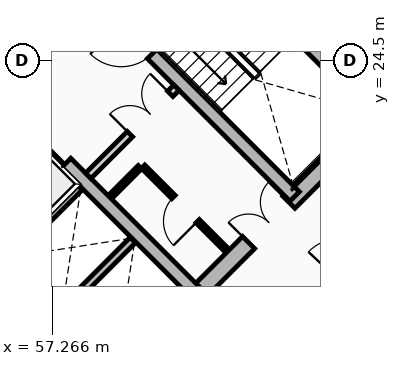
"""IFC4 building model, lengths in metres.
Left out: names, types, materials, properties, quantities, classifications, styles, units other than length and angle.
Written with IfcOpenShell. Run it as: python <this file> out.ifc"""

import sys

from ifc_helpers import new_model, si_unit, direction, frame, frame_2d, origin, place, context, subcontext, project, spatial, rectangle, extrude, source, transform, mapped, element, fill, save


model = new_model("IFC4")
c1 = context("Model", 3, precision=1e-05, world=origin(), true_north=direction((0.0, 1.0)))
c2 = subcontext(c1, "Body", "Model", "MODEL_VIEW")
j1 = project(units=[si_unit("LENGTHUNIT", "METRE"), si_unit("PLANEANGLEUNIT", "RADIAN")], contexts=[c1])
p1 = place(None, origin())
s1 = spatial("IfcSite", under=j1, at=p1, CompositionType="ELEMENT")
p2 = place(p1, origin())
s2 = spatial("IfcBuilding", under=s1, at=p2, CompositionType="ELEMENT")
p3 = place(p2, frame((0.0, 0.0, 122.53)))
s3 = spatial("IfcBuildingStorey", under=s2, at=p3, CompositionType="ELEMENT", Elevation=122.53)
for number, where, z_axis, x_axis in (
    (1, (58.737, 15.697, 0.0), (0.0, 0.0, 1.0), (-0.707, 0.707, 0.0)),
    (2, (66.303, 23.263, 0.0), (0.0, 0.0, 1.0), (-0.707, 0.707, 0.0)),
):
    element("IfcWall", number, at=place(p3, frame(where, z_axis=z_axis, x_axis=x_axis)), inside=s3, PredefinedType="SHEAR", context=c2, shape_type="SweptSolid", body=[
        extrude(rectangle(XDim=14.2, YDim=0.45, at=frame_2d((7.1, 0.0))), origin(), (0.0, 0.0, 1.0), 2.91),
    ])
p4 = place(p3, frame((58.578, 15.856, 0.0), z_axis=(0.0, 0.0, 1.0), x_axis=(0.707106781187, 0.707106781187, 0.0)))
e3 = element("IfcWall", 3, at=p4, inside=s3, PredefinedType="SHEAR", context=c2, shape_type="SweptSolid", body=[
    extrude(rectangle(XDim=10.7, YDim=0.45, at=frame_2d((5.35, 0.0))), origin(), (0.0, 0.0, 1.0), 2.91),
])
m1 = source(origin(), c2, "Body", "SweptSolid", [
    extrude(rectangle(XDim=1.5, YDim=2.02, at=frame_2d((0.75, 1.01))), frame((0.0, 0.235, 0.0), z_axis=(0.0, -1.0, 0.0), x_axis=(1.0, 0.0, 0.0)), (0.0, 0.0, 1.0), 0.47),
])
p5 = place(p4, frame((5.45, 0.0, 0.0)))
e4 = element("IfcOpeningElement", 4, at=p5, cuts=e3, PredefinedType="OPENING", context=c2, shape_type="MappedRepresentation", body=[
    mapped(m1, transform((0.0, 0.0, 0.0), x_axis=(1.0, 0.0, 0.0), y_axis=(0.0, 1.0, 0.0), z_axis=(0.0, 0.0, 1.0), scale=1.0)),
])
p6 = place(p3, frame((61.078, 18.355, 0.0), z_axis=(0.0, 0.0, 1.0), x_axis=(-0.707106781187, 0.707106781187, 0.0)))
e5 = element("IfcWall", 5, at=p6, inside=s3, PredefinedType="SHEAR", context=c2, shape_type="SweptSolid", body=[
    extrude(rectangle(XDim=13.75, YDim=0.35, at=frame_2d((6.875, 0.0))), origin(), (0.0, 0.0, 1.0), 2.91),
])
m2 = source(origin(), c2, "Body", "SweptSolid", [
    extrude(rectangle(XDim=1.1, YDim=2.015, at=frame_2d((0.55, 1.007))), frame((0.0, 0.185, 0.0), z_axis=(0.0, -1.0, 0.0), x_axis=(1.0, 0.0, 0.0)), (0.0, 0.0, 1.0), 0.37),
])
p7 = place(p6, frame((4.875, 0.0, 0.0)))
e6 = element("IfcOpeningElement", 6, at=p7, cuts=e5, PredefinedType="OPENING", context=c2, shape_type="MappedRepresentation", body=[
    mapped(m2, transform((0.0, 0.0, 0.0), x_axis=(1.0, 0.0, 0.0), y_axis=(0.0, 1.0, 0.0), z_axis=(0.0, 0.0, 1.0), scale=1.0)),
])
m3 = source(origin(), c2, "Body", "SweptSolid", [
    extrude(rectangle(XDim=1.15, YDim=2.02, at=frame_2d((0.575, 1.01))), frame((0.0, 0.185, 0.0), z_axis=(0.0, -1.0, 0.0), x_axis=(1.0, 0.0, 0.0)), (0.0, 0.0, 1.0), 0.37),
])
p8 = place(p6, frame((7.295, 0.0, 0.0)))
e7 = element("IfcOpeningElement", 7, at=p8, cuts=e5, PredefinedType="OPENING", context=c2, shape_type="MappedRepresentation", body=[
    mapped(m3, transform((0.0, 0.0, 0.0), x_axis=(1.0, 0.0, 0.0), y_axis=(0.0, 1.0, 0.0), z_axis=(0.0, 0.0, 1.0), scale=1.0)),
])
p9 = place(p3, frame((63.645, 20.922, 0.0), z_axis=(0.0, 0.0, 1.0), x_axis=(-0.707106781187, 0.707106781187, 0.0)))
e8 = element("IfcWall", 8, at=p9, inside=s3, PredefinedType="SHEAR", context=c2, shape_type="SweptSolid", body=[
    extrude(rectangle(XDim=13.75, YDim=0.35, at=frame_2d((6.875, 0.0))), origin(), (0.0, 0.0, 1.0), 2.91),
])
p10 = place(p9, frame((10.0, 0.0, 0.0)))
e9 = element("IfcOpeningElement", 9, at=p10, cuts=e8, PredefinedType="OPENING", context=c2, shape_type="MappedRepresentation", body=[
    mapped(m2, transform((0.0, 0.0, 0.0), x_axis=(1.0, 0.0, 0.0), y_axis=(0.0, 1.0, 0.0), z_axis=(0.0, 0.0, 1.0), scale=1.0)),
])
p11 = place(p9, frame((12.0, 0.0, 0.0)))
e10 = element("IfcOpeningElement", 10, at=p11, cuts=e8, PredefinedType="OPENING", context=c2, shape_type="MappedRepresentation", body=[
    mapped(m2, transform((0.0, 0.0, 0.0), x_axis=(1.0, 0.0, 0.0), y_axis=(0.0, 1.0, 0.0), z_axis=(0.0, 0.0, 1.0), scale=1.0)),
])
p12 = place(p9, frame((5.305, 0.0, 0.0)))
e11 = element("IfcOpeningElement", 11, at=p12, cuts=e8, PredefinedType="OPENING", context=c2, shape_type="MappedRepresentation", body=[
    mapped(m3, transform((0.0, 0.0, 0.0), x_axis=(1.0, 0.0, 0.0), y_axis=(0.0, 1.0, 0.0), z_axis=(0.0, 0.0, 1.0), scale=1.0)),
])
p13 = place(p3, frame((65.83, 23.107, 0.0), z_axis=(0.0, 0.0, 1.0), x_axis=(-0.707088616009, 0.707124945897, 0.0)))
e12 = element("IfcWall", 12, at=p13, inside=s3, PredefinedType="SHEAR", context=c2, shape_type="SweptSolid", body=[
    extrude(rectangle(XDim=6.72, YDim=0.35, at=frame_2d((3.36, 0.0))), origin(), (0.0, 0.0, 1.0), 2.91),
])
p14 = place(p3, frame((55.888, 19.069, 0.0), z_axis=(0.0, 0.0, 1.0), x_axis=(0.707106781187, 0.707106781187, 0.0)))
e13 = element("IfcWall", 13, at=p14, inside=s3, PredefinedType="SHEAR", context=c2, shape_type="SweptSolid", body=[
    extrude(rectangle(XDim=2.97, YDim=0.2, at=frame_2d((1.485, 0.0))), origin(), (0.0, 0.0, 1.0), 2.91),
])
p15 = place(p3, frame((57.284, 17.673, 0.0), z_axis=(0.0, 0.0, 1.0), x_axis=(0.707147878904, 0.70706568108, 0.0)))
e14 = element("IfcWall", 14, at=p15, inside=s3, PredefinedType="SHEAR", context=c2, shape_type="SweptSolid", body=[
    extrude(rectangle(XDim=2.97, YDim=0.2, at=frame_2d((1.485, 0.0))), origin(), (0.0, 0.0, 1.0), 2.91),
])
p16 = place(p3, frame((57.412, 17.97, 0.0), z_axis=(0.0, 0.0, 1.0), x_axis=(-0.707106781187, 0.707106781187, 0.0)))
e15 = element("IfcWall", 15, at=p16, inside=s3, PredefinedType="SHEAR", context=c2, shape_type="SweptSolid", body=[
    extrude(rectangle(XDim=1.735, YDim=0.2, at=frame_2d((0.867, 0.0))), origin(), (0.0, 0.0, 1.0), 2.91),
])
p17 = place(p3, frame((58.214, 21.467, 0.0), z_axis=(0.0, 0.0, 1.0), x_axis=(0.707106781187, 0.707106781187, 0.0)))
e16 = element("IfcWall", 16, at=p17, inside=s3, PredefinedType="PARTITIONING", context=c2, shape_type="SweptSolid", body=[
    extrude(rectangle(XDim=3.28, YDim=0.2, at=frame_2d((1.64, 0.0))), origin(), (0.0, 0.0, 1.0), 2.615),
])
m4 = source(origin(), c2, "Body", "SweptSolid", [
    extrude(rectangle(XDim=1.5, YDim=2.02, at=frame_2d((0.75, 1.01))), frame((0.0, 0.11, 0.0), z_axis=(0.0, -1.0, 0.0), x_axis=(1.0, 0.0, 0.0)), (0.0, 0.0, 1.0), 0.22),
])
p18 = place(p17, frame((1.55, 0.0, 0.0)))
e17 = element("IfcOpeningElement", 17, at=p18, cuts=e16, PredefinedType="OPENING", context=c2, shape_type="MappedRepresentation", body=[
    mapped(m4, transform((0.0, 0.0, 0.0), x_axis=(1.0, 0.0, 0.0), y_axis=(0.0, 1.0, 0.0), z_axis=(0.0, 0.0, 1.0), scale=1.0)),
])
p19 = place(p3, frame((54.961, 24.719, 0.0), z_axis=(0.0, 0.0, 1.0), x_axis=(0.707106781187, 0.707106781187, 0.0)))
e18 = element("IfcWall", 18, at=p19, inside=s3, PredefinedType="PARTITIONING", context=c2, shape_type="SweptSolid", body=[
    extrude(rectangle(XDim=3.28, YDim=0.2, at=frame_2d((1.64, 0.0))), origin(), (0.0, 0.0, 1.0), 2.615),
])
m5 = source(origin(), c2, "Body", "SweptSolid", [
    extrude(rectangle(XDim=0.9, YDim=2.005, at=frame_2d((0.45, 1.002))), frame((0.0, 0.11, 0.0), z_axis=(0.0, -1.0, 0.0), x_axis=(1.0, 0.0, 0.0)), (0.0, 0.0, 1.0), 0.22),
])
p20 = place(p19, frame((0.16, 0.0, 0.0)))
e19 = element("IfcOpeningElement", 19, at=p20, cuts=e18, PredefinedType="OPENING", context=c2, shape_type="MappedRepresentation", body=[
    mapped(m5, transform((0.0, 0.0, 0.0), x_axis=(1.0, 0.0, 0.0), y_axis=(0.0, 1.0, 0.0), z_axis=(0.0, 0.0, 1.0), scale=1.0)),
])
p21 = place(p3, frame((61.835, 19.529, 0.0), z_axis=(0.0, 0.0, 1.0), x_axis=(-0.707146413884, 0.707067146267, 0.0)))
e20 = element("IfcWall", 20, at=p21, inside=s3, PredefinedType="PARTITIONING", context=c2, shape_type="SweptSolid", body=[
    extrude(rectangle(XDim=3.08, YDim=0.125, at=frame_2d((1.54, 0.0))), origin(), (0.0, 0.0, 1.0), 2.615),
])
m6 = source(origin(), c2, "Body", "SweptSolid", [
    extrude(rectangle(XDim=0.9, YDim=2.005, at=frame_2d((0.45, 1.002))), frame((0.0, 0.073, 0.0), z_axis=(0.0, -1.0, 0.0), x_axis=(1.0, 0.0, 0.0)), (0.0, 0.0, 1.0), 0.145),
])
p22 = place(p21, frame((1.05, 0.0, 0.0)))
e21 = element("IfcOpeningElement", 21, at=p22, cuts=e20, PredefinedType="OPENING", context=c2, shape_type="MappedRepresentation", body=[
    mapped(m6, transform((0.0, 0.0, 0.0), x_axis=(1.0, 0.0, 0.0), y_axis=(0.0, 1.0, 0.0), z_axis=(0.0, 0.0, 1.0), scale=1.0)),
])
p23 = place(p3, frame((58.794, 20.915, 0.0), z_axis=(0.0, 0.0, 1.0), x_axis=(0.707106781187, 0.707106781187, 0.0)))
e22 = element("IfcWall", 22, at=p23, inside=s3, PredefinedType="PARTITIONING", context=c2, shape_type="SweptSolid", body=[
    extrude(rectangle(XDim=1.1, YDim=0.125, at=frame_2d((0.55, 0.0))), origin(), (0.0, 0.0, 1.0), 2.615),
])
p24 = place(p3, frame((62.867, 16.702, 0.0), z_axis=(0.0, 0.0, 1.0), x_axis=(0.682449206191, 0.73093302085, 0.0)))
e23 = element("IfcWall", 23, at=p24, inside=s3, PredefinedType="PARTITIONING", context=c2, shape_type="SweptSolid", body=[
    extrude(rectangle(XDim=6.642, YDim=0.15, at=frame_2d((3.321, 0.0))), origin(), (0.0, 0.0, 1.0), 2.185),
])
m7 = source(origin(), c2, "Body", "SweptSolid", [
    extrude(rectangle(XDim=1.05, YDim=2.015, at=frame_2d((0.525, 1.007))), frame((0.0, 0.085, 0.0), z_axis=(0.0, -1.0, 0.0), x_axis=(1.0, 0.0, 0.0)), (0.0, 0.0, 1.0), 0.17),
])
p25 = place(p24, frame((2.796, 0.0, 0.0)))
e24 = element("IfcOpeningElement", 24, at=p25, cuts=e23, PredefinedType="OPENING", context=c2, shape_type="MappedRepresentation", body=[
    mapped(m7, transform((0.0, 0.0, 0.0), x_axis=(1.0, 0.0, 0.0), y_axis=(0.0, 1.0, 0.0), z_axis=(0.0, 0.0, 1.0), scale=1.0)),
])
m8 = source(origin(), c2, "Body", "SweptSolid", [
    extrude(rectangle(XDim=1.1, YDim=2.015, at=frame_2d((0.55, 1.007))), frame((0.0, 0.025, 0.0), z_axis=(0.0, -1.0, 0.0), x_axis=(1.0, 0.0, 0.0)), (0.0, 0.0, 1.0), 0.05),
])
p26 = place(p7, origin())
e25 = element("IfcDoor", 25, at=p26, inside=s3, OperationType="SLIDING_TO_LEFT", PredefinedType="DOOR", context=c2, shape_type="MappedRepresentation", body=[
    mapped(m8, transform((0.0, 0.0, 0.0), x_axis=(1.0, 0.0, 0.0), y_axis=(0.0, 1.0, 0.0), z_axis=(0.0, 0.0, 1.0), scale=1.0)),
])
fill(e6, e25)
m9 = source(origin(), c2, "Body", "SweptSolid", [
    extrude(rectangle(XDim=1.15, YDim=2.02, at=frame_2d((0.575, 1.01))), frame((0.0, 0.025, 0.0), z_axis=(0.0, -1.0, 0.0), x_axis=(1.0, 0.0, 0.0)), (0.0, 0.0, 1.0), 0.05),
])
p27 = place(p12, origin())
e26 = element("IfcDoor", 26, at=p27, inside=s3, OperationType="SINGLE_SWING_RIGHT", PredefinedType="DOOR", context=c2, shape_type="MappedRepresentation", body=[
    mapped(m9, transform((0.0, 0.0, 0.0), x_axis=(1.0, 0.0, 0.0), y_axis=(0.0, 1.0, 0.0), z_axis=(0.0, 0.0, 1.0), scale=1.0)),
])
fill(e11, e26)
m10 = source(origin(), c2, "Body", "SweptSolid", [
    extrude(rectangle(XDim=1.5, YDim=2.02, at=frame_2d((0.75, 1.01))), frame((0.0, 0.025, 0.0), z_axis=(0.0, -1.0, 0.0), x_axis=(1.0, 0.0, 0.0)), (0.0, 0.0, 1.0), 0.05),
])
p28 = place(p5, origin())
e27 = element("IfcDoor", 27, at=p28, inside=s3, OperationType="DOUBLE_DOOR_SINGLE_SWING", PredefinedType="DOOR", context=c2, shape_type="MappedRepresentation", body=[
    mapped(m10, transform((0.0, 0.0, 0.0), x_axis=(1.0, 0.0, 0.0), y_axis=(0.0, 1.0, 0.0), z_axis=(0.0, 0.0, 1.0), scale=1.0)),
])
fill(e4, e27)
p29 = place(p18, origin())
e28 = element("IfcDoor", 28, at=p29, inside=s3, OperationType="DOUBLE_DOOR_SINGLE_SWING", PredefinedType="DOOR", context=c2, shape_type="MappedRepresentation", body=[
    mapped(m10, transform((0.0, 0.0, 0.0), x_axis=(1.0, 0.0, 0.0), y_axis=(0.0, 1.0, 0.0), z_axis=(0.0, 0.0, 1.0), scale=1.0)),
])
fill(e17, e28)
m11 = source(origin(), c2, "Body", "SweptSolid", [
    extrude(rectangle(XDim=0.9, YDim=2.005, at=frame_2d((0.45, 1.002))), frame((0.0, 0.025, 0.0), z_axis=(0.0, -1.0, 0.0), x_axis=(1.0, 0.0, 0.0)), (0.0, 0.0, 1.0), 0.05),
])
p30 = place(p22, origin())
e29 = element("IfcDoor", 29, at=p30, inside=s3, OperationType="SINGLE_SWING_LEFT", PredefinedType="DOOR", context=c2, shape_type="MappedRepresentation", body=[
    mapped(m11, transform((0.0, 0.0, 0.0), x_axis=(1.0, 0.0, 0.0), y_axis=(0.0, 1.0, 0.0), z_axis=(0.0, 0.0, 1.0), scale=1.0)),
])
fill(e21, e29)
save(model, sys.argv[1])
